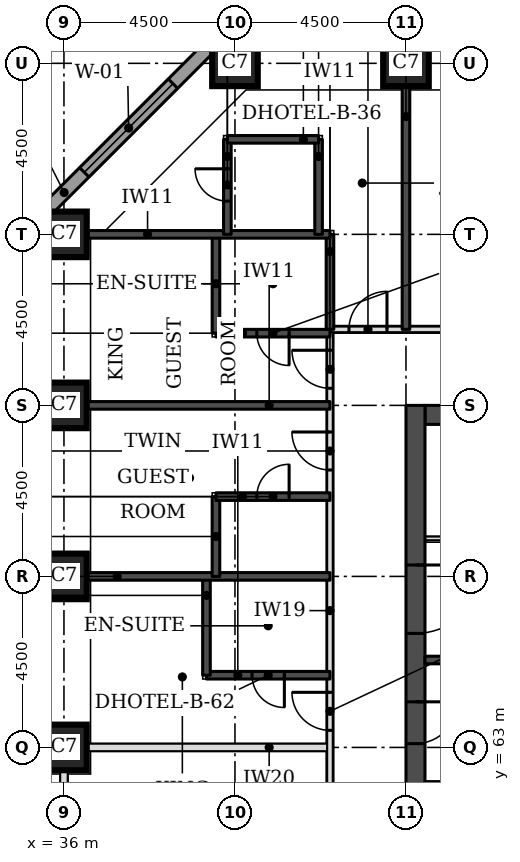
"""IFC4 building model, lengths in metres.
Left out: names, types, materials, properties, quantities, classifications, styles, units other than length and angle.
Written with IfcOpenShell. Run it as: python <this file> out.ifc"""

import sys

from ifc_helpers import new_model, si_unit, direction, frame, frame_2d, origin, origin_2d, place, context, subcontext, project, spatial, rectangle, extrude, element, fill, save


model = new_model("IFC4")
c1 = context("Model", 3, precision=1e-05, world=origin(), true_north=direction((0.0, 1.0)))
c2 = subcontext(c1, "Body", "Model", "MODEL_VIEW")
j1 = project(units=[si_unit("LENGTHUNIT", "METRE"), si_unit("PLANEANGLEUNIT", "RADIAN")], contexts=[c1])
p1 = place(None, origin())
s1 = spatial("IfcSite", under=j1, at=p1, CompositionType="ELEMENT")
p2 = place(p1, origin())
s2 = spatial("IfcBuilding", under=s1, at=p2, CompositionType="ELEMENT")
p3 = place(p2, frame((0.0, 0.0, 52.8)))
s3 = spatial("IfcBuildingStorey", under=s2, at=p3, CompositionType="ELEMENT", Elevation=52.8)
for number, where, z_axis, x_axis in (
    (1, (36.0, 63.0, 0.0), (0.0, 0.0, 1.0), (1.0, 0.0, 0.0)),
    (2, (36.0, 67.5, 0.0), (0.0, 0.0, 1.0), (1.0, 0.0, 0.0)),
    (3, (36.0, 72.0, 0.0), (0.0, 0.0, 1.0), (1.0, 0.0, 0.0)),
    (4, (36.0, 76.5, 0.0), (0.0, 0.0, 1.0), (1.0, 0.0, 0.0)),
    (5, (40.5, 81.0, 0.0), (0.0, 0.0, 1.0), (1.0, 0.0, 0.0)),
    (6, (45.0, 81.0, 0.0), (0.0, 0.0, 1.0), (1.0, 0.0, 0.0)),
):
    element("IfcColumn", number, at=place(p3, frame(where, z_axis=z_axis, x_axis=x_axis)), inside=s3, PredefinedType="COLUMN", context=c2, shape_type="SweptSolid", body=[
        extrude(rectangle(XDim=1.2, YDim=1.2, at=origin_2d()), origin(), (0.0, 0.0, 1.0), 3.3),
    ])
p4 = place(p3, frame((45.5, 71.75, 0.0), z_axis=(0.0, 0.0, 1.0), x_axis=(1.0, 0.0, 0.0)))
e7 = element("IfcWall", 7, at=p4, inside=s3, PredefinedType="SHEAR", context=c2, shape_type="SweptSolid", body=[
    extrude(rectangle(XDim=21.5, YDim=0.5, at=frame_2d((10.75, 0.0))), origin(), (0.0, 0.0, 1.0), 3.3),
])
p5 = place(p3, frame((45.25, 49.5, 0.0), z_axis=(0.0, 0.0, 1.0), x_axis=(0.0, 1.0, 0.0)))
e8 = element("IfcWall", 8, at=p5, inside=s3, PredefinedType="SHEAR", context=c2, shape_type="SweptSolid", body=[
    extrude(rectangle(XDim=22.5, YDim=0.5, at=frame_2d((11.25, 0.0))), origin(), (0.0, 0.0, 1.0), 3.3),
])
p6 = place(p5, frame((4.2, 0.0, 0.0)))
e9 = element("IfcOpeningElement", 9, at=p6, cuts=e8, PredefinedType="OPENING", context=c2, shape_type="SweptSolid", body=[
    extrude(rectangle(XDim=1.8, YDim=2.1, at=frame_2d((0.9, 1.05))), frame((0.0, 0.26, 0.0), z_axis=(0.0, -1.0, 0.0), x_axis=(1.0, 0.0, 0.0)), (0.0, 0.0, 1.0), 0.52),
])
p7 = place(p5, frame((6.9, 0.0, 0.0)))
e10 = element("IfcOpeningElement", 10, at=p7, cuts=e8, PredefinedType="OPENING", context=c2, shape_type="SweptSolid", body=[
    extrude(rectangle(XDim=1.1, YDim=2.1, at=frame_2d((0.55, 1.05))), frame((0.0, 0.26, 0.0), z_axis=(0.0, -1.0, 0.0), x_axis=(1.0, 0.0, 0.0)), (0.0, 0.0, 1.0), 0.52),
])
p8 = place(p5, frame((13.6, 0.0, 0.0)))
e11 = element("IfcOpeningElement", 11, at=p8, cuts=e8, PredefinedType="OPENING", context=c2, shape_type="SweptSolid", body=[
    extrude(rectangle(XDim=1.1, YDim=2.1, at=frame_2d((0.55, 1.05))), frame((0.0, 0.26, 0.0), z_axis=(0.0, -1.0, 0.0), x_axis=(1.0, 0.0, 0.0)), (0.0, 0.0, 1.0), 0.52),
])
p9 = place(p5, frame((16.5, 0.0, 0.0)))
e12 = element("IfcOpeningElement", 12, at=p9, cuts=e8, PredefinedType="OPENING", context=c2, shape_type="SweptSolid", body=[
    extrude(rectangle(XDim=1.8, YDim=2.1, at=frame_2d((0.9, 1.05))), frame((0.0, 0.26, 0.0), z_axis=(0.0, -1.0, 0.0), x_axis=(1.0, 0.0, 0.0)), (0.0, 0.0, 1.0), 0.52),
])
p10 = place(p3, frame((40.23, 81.826, 0.0), z_axis=(0.0, 0.0, 1.0), x_axis=(-0.707106781187, -0.707106781187, 0.0)))
e13 = element("IfcWall", 13, at=p10, inside=s3, PredefinedType="STANDARD", context=c2, shape_type="SweptSolid", body=[
    extrude(rectangle(XDim=7.151, YDim=0.35, at=frame_2d((3.576, 0.0))), origin(), (0.0, 0.0, 1.0), 3.055),
])
p11 = place(p10, frame((1.926, 0.0, 0.8)))
e14 = element("IfcOpeningElement", 14, at=p11, cuts=e13, PredefinedType="OPENING", context=c2, shape_type="SweptSolid", body=[
    extrude(rectangle(XDim=3.3, YDim=1.5, at=frame_2d((1.65, 0.75))), frame((0.0, 0.185, 0.0), z_axis=(0.0, -1.0, 0.0), x_axis=(1.0, 0.0, 0.0)), (0.0, 0.0, 1.0), 0.37),
])
p12 = place(p3, frame((36.0, 56.0, 0.0), z_axis=(0.0, 0.0, 1.0), x_axis=(0.0, 1.0, 0.0)))
e15 = element("IfcWall", 15, at=p12, inside=s3, PredefinedType="PARTITIONING", context=c2, shape_type="SweptSolid", body=[
    extrude(rectangle(XDim=6.4, YDim=0.2, at=frame_2d((3.2, 0.0))), origin(), (0.0, 0.0, 1.0), 2.33),
])
p13 = place(p3, frame((36.6, 63.0, 0.0), z_axis=(0.0, 0.0, 1.0), x_axis=(1.0, 0.0, 0.0)))
e16 = element("IfcWall", 16, at=p13, inside=s3, PredefinedType="PARTITIONING", context=c2, shape_type="SweptSolid", body=[
    extrude(rectangle(XDim=6.4, YDim=0.2, at=frame_2d((3.2, 0.0))), origin(), (0.0, 0.0, 1.0), 3.08),
])
p14 = place(p3, frame((43.0, 56.0, 0.0), z_axis=(0.0, 0.0, 1.0), x_axis=(0.0, 1.0, 0.0)))
e17 = element("IfcWall", 17, at=p14, inside=s3, PredefinedType="PARTITIONING", context=c2, shape_type="SweptSolid", body=[
    extrude(rectangle(XDim=18.0, YDim=0.15, at=frame_2d((9.0, 0.0))), origin(), (0.0, 0.0, 1.0), 3.08),
])
p15 = place(p14, frame((7.45, 0.0, 0.0)))
e18 = element("IfcOpeningElement", 18, at=p15, cuts=e17, PredefinedType="OPENING", context=c2, shape_type="SweptSolid", body=[
    extrude(rectangle(XDim=1.0, YDim=2.1, at=frame_2d((0.5, 1.05))), frame((0.0, 0.085, 0.0), z_axis=(0.0, -1.0, 0.0), x_axis=(1.0, 0.0, 0.0)), (0.0, 0.0, 1.0), 0.17),
])
p16 = place(p14, frame((14.3, 0.0, 0.0)))
e19 = element("IfcOpeningElement", 19, at=p16, cuts=e17, PredefinedType="OPENING", context=c2, shape_type="SweptSolid", body=[
    extrude(rectangle(XDim=1.0, YDim=2.1, at=frame_2d((0.5, 1.05))), frame((0.0, 0.085, 0.0), z_axis=(0.0, -1.0, 0.0), x_axis=(1.0, 0.0, 0.0)), (0.0, 0.0, 1.0), 0.17),
])
p17 = place(p14, frame((16.45, 0.0, 0.0)))
e20 = element("IfcOpeningElement", 20, at=p17, cuts=e17, PredefinedType="OPENING", context=c2, shape_type="SweptSolid", body=[
    extrude(rectangle(XDim=1.0, YDim=2.1, at=frame_2d((0.5, 1.05))), frame((0.0, 0.085, 0.0), z_axis=(0.0, -1.0, 0.0), x_axis=(1.0, 0.0, 0.0)), (0.0, 0.0, 1.0), 0.17),
])
p18 = place(p14, frame((3.05, 0.0, 0.0)))
e21 = element("IfcOpeningElement", 21, at=p18, cuts=e17, PredefinedType="OPENING", context=c2, shape_type="SweptSolid", body=[
    extrude(rectangle(XDim=0.9, YDim=2.1, at=frame_2d((0.45, 1.05))), frame((0.0, 0.085, 0.0), z_axis=(0.0, -1.0, 0.0), x_axis=(1.0, 0.0, 0.0)), (0.0, 0.0, 1.0), 0.17),
])
p19 = place(p3, frame((43.0, 74.0, 0.0), z_axis=(0.0, 0.0, 1.0), x_axis=(1.0, 0.0, 0.0)))
e22 = element("IfcWall", 22, at=p19, inside=s3, PredefinedType="PARTITIONING", context=c2, shape_type="SweptSolid", body=[
    extrude(rectangle(XDim=26.5, YDim=0.15, at=frame_2d((13.25, 0.0))), origin(), (0.0, 0.0, 1.0), 3.08),
])
p20 = place(p19, frame((4.65, 0.0, 0.0)))
e23 = element("IfcOpeningElement", 23, at=p20, cuts=e22, PredefinedType="OPENING", context=c2, shape_type="SweptSolid", body=[
    extrude(rectangle(XDim=1.0, YDim=2.1, at=frame_2d((0.5, 1.05))), frame((0.0, 0.085, 0.0), z_axis=(0.0, -1.0, 0.0), x_axis=(1.0, 0.0, 0.0)), (0.0, 0.0, 1.0), 0.17),
])
p21 = place(p19, frame((16.6, 0.0, 0.0)))
e24 = element("IfcOpeningElement", 24, at=p21, cuts=e22, PredefinedType="OPENING", context=c2, shape_type="SweptSolid", body=[
    extrude(rectangle(XDim=1.0, YDim=2.1, at=frame_2d((0.5, 1.05))), frame((0.0, 0.085, 0.0), z_axis=(0.0, -1.0, 0.0), x_axis=(1.0, 0.0, 0.0)), (0.0, 0.0, 1.0), 0.17),
])
p22 = place(p19, frame((20.7, 0.0, 0.0)))
e25 = element("IfcOpeningElement", 25, at=p22, cuts=e22, PredefinedType="OPENING", context=c2, shape_type="SweptSolid", body=[
    extrude(rectangle(XDim=1.0, YDim=2.1, at=frame_2d((0.5, 1.05))), frame((0.0, 0.085, 0.0), z_axis=(0.0, -1.0, 0.0), x_axis=(1.0, 0.0, 0.0)), (0.0, 0.0, 1.0), 0.17),
])
p23 = place(p19, frame((0.5, 0.0, 0.0)))
e26 = element("IfcOpeningElement", 26, at=p23, cuts=e22, PredefinedType="OPENING", context=c2, shape_type="SweptSolid", body=[
    extrude(rectangle(XDim=1.0, YDim=2.1, at=frame_2d((0.5, 1.05))), frame((0.0, 0.085, 0.0), z_axis=(0.0, -1.0, 0.0), x_axis=(1.0, 0.0, 0.0)), (0.0, 0.0, 1.0), 0.17),
])
p24 = place(p19, frame((25.0, 0.0, 0.0)))
e27 = element("IfcOpeningElement", 27, at=p24, cuts=e22, PredefinedType="OPENING", context=c2, shape_type="SweptSolid", body=[
    extrude(rectangle(XDim=1.0, YDim=2.1, at=frame_2d((0.5, 1.05))), frame((0.0, 0.085, 0.0), z_axis=(0.0, -1.0, 0.0), x_axis=(1.0, 0.0, 0.0)), (0.0, 0.0, 1.0), 0.17),
])
p25 = place(p3, frame((39.75, 64.9, 0.0), z_axis=(0.0, 0.0, 1.0), x_axis=(1.0, 0.0, 0.0)))
e28 = element("IfcWall", 28, at=p25, inside=s3, PredefinedType="SOLIDWALL", context=c2, shape_type="SweptSolid", body=[
    extrude(rectangle(XDim=3.25, YDim=0.2, at=frame_2d((1.625, 0.0))), origin(), (0.0, 0.0, 1.0), 3.08),
])
p26 = place(p25, frame((1.2, 0.0, 0.0)))
e29 = element("IfcOpeningElement", 29, at=p26, cuts=e28, PredefinedType="OPENING", context=c2, shape_type="SweptSolid", body=[
    extrude(rectangle(XDim=0.85, YDim=2.1, at=frame_2d((0.425, 1.05))), frame((0.0, 0.11, 0.0), z_axis=(0.0, -1.0, 0.0), x_axis=(1.0, 0.0, 0.0)), (0.0, 0.0, 1.0), 0.22),
])
p27 = place(p3, frame((39.75, 64.9, 0.0), z_axis=(0.0, 0.0, 1.0), x_axis=(0.0, 1.0, 0.0)))
e30 = element("IfcWall", 30, at=p27, inside=s3, PredefinedType="SOLIDWALL", context=c2, shape_type="SweptSolid", body=[
    extrude(rectangle(XDim=2.6, YDim=0.2, at=frame_2d((1.3, 0.0))), origin(), (0.0, 0.0, 1.0), 3.08),
])
p28 = place(p3, frame((36.6, 67.5, 0.0), z_axis=(0.0, 0.0, 1.0), x_axis=(1.0, 0.0, 0.0)))
e31 = element("IfcWall", 31, at=p28, inside=s3, PredefinedType="SOLIDWALL", context=c2, shape_type="SweptSolid", body=[
    extrude(rectangle(XDim=6.4, YDim=0.2, at=frame_2d((3.2, 0.0))), origin(), (0.0, 0.0, 1.0), 3.08),
])
p29 = place(p3, frame((40.0, 67.5, 0.0), z_axis=(0.0, 0.0, 1.0), x_axis=(0.0, 1.0, 0.0)))
e32 = element("IfcWall", 32, at=p29, inside=s3, PredefinedType="SOLIDWALL", context=c2, shape_type="SweptSolid", body=[
    extrude(rectangle(XDim=2.1, YDim=0.2, at=frame_2d((1.05, 0.0))), origin(), (0.0, 0.0, 1.0), 3.08),
])
p30 = place(p3, frame((40.0, 69.6, 0.0), z_axis=(0.0, 0.0, 1.0), x_axis=(1.0, 0.0, 0.0)))
e33 = element("IfcWall", 33, at=p30, inside=s3, PredefinedType="SOLIDWALL", context=c2, shape_type="SweptSolid", body=[
    extrude(rectangle(XDim=3.0, YDim=0.2, at=frame_2d((1.5, 0.0))), origin(), (0.0, 0.0, 1.0), 3.08),
])
p31 = place(p30, frame((1.075, 0.0, 0.0)))
e34 = element("IfcOpeningElement", 34, at=p31, cuts=e33, PredefinedType="OPENING", context=c2, shape_type="SweptSolid", body=[
    extrude(rectangle(XDim=0.85, YDim=2.1, at=frame_2d((0.425, 1.05))), frame((0.0, 0.11, 0.0), z_axis=(0.0, -1.0, 0.0), x_axis=(1.0, 0.0, 0.0)), (0.0, 0.0, 1.0), 0.22),
])
p32 = place(p3, frame((36.6, 72.0, 0.0), z_axis=(0.0, 0.0, 1.0), x_axis=(1.0, 0.0, 0.0)))
e35 = element("IfcWall", 35, at=p32, inside=s3, PredefinedType="SOLIDWALL", context=c2, shape_type="SweptSolid", body=[
    extrude(rectangle(XDim=6.4, YDim=0.2, at=frame_2d((3.2, 0.0))), origin(), (0.0, 0.0, 1.0), 3.08),
])
p33 = place(p3, frame((40.0, 73.9, 0.0), z_axis=(0.0, 0.0, 1.0), x_axis=(1.0, 0.0, 0.0)))
e36 = element("IfcWall", 36, at=p33, inside=s3, PredefinedType="SOLIDWALL", context=c2, shape_type="SweptSolid", body=[
    extrude(rectangle(XDim=3.0, YDim=0.2, at=frame_2d((1.5, 0.0))), origin(), (0.0, 0.0, 1.0), 3.08),
])
p34 = place(p33, frame((1.075, 0.0, 0.0)))
e37 = element("IfcOpeningElement", 37, at=p34, cuts=e36, PredefinedType="OPENING", context=c2, shape_type="SweptSolid", body=[
    extrude(rectangle(XDim=0.85, YDim=2.1, at=frame_2d((0.425, 1.05))), frame((0.0, 0.11, 0.0), z_axis=(0.0, -1.0, 0.0), x_axis=(1.0, 0.0, 0.0)), (0.0, 0.0, 1.0), 0.22),
])
p35 = place(p3, frame((40.0, 73.9, 0.0), z_axis=(0.0, 0.0, 1.0), x_axis=(0.0, 1.0, 0.0)))
e38 = element("IfcWall", 38, at=p35, inside=s3, PredefinedType="SOLIDWALL", context=c2, shape_type="SweptSolid", body=[
    extrude(rectangle(XDim=2.6, YDim=0.2, at=frame_2d((1.3, 0.0))), origin(), (0.0, 0.0, 1.0), 3.08),
])
p36 = place(p3, frame((43.0, 74.0, 0.0), z_axis=(0.0, 0.0, 1.0), x_axis=(0.0, 1.0, 0.0)))
e39 = element("IfcWall", 39, at=p36, inside=s3, PredefinedType="SOLIDWALL", context=c2, shape_type="SweptSolid", body=[
    extrude(rectangle(XDim=2.5, YDim=0.2, at=frame_2d((1.25, 0.0))), origin(), (0.0, 0.0, 1.0), 3.08),
])
for number, where, z_axis, x_axis in (
    (40, (45.0, 74.0, 0.0), (0.0, 0.0, 1.0), (0.0, 1.0, 0.0)),
    (41, (36.6, 76.5, 0.0), (0.0, 0.0, 1.0), (1.0, 0.0, 0.0)),
):
    element("IfcWall", number, at=place(p3, frame(where, z_axis=z_axis, x_axis=x_axis)), inside=s3, PredefinedType="SOLIDWALL", context=c2, shape_type="SweptSolid", body=[
        extrude(rectangle(XDim=6.4, YDim=0.2, at=frame_2d((3.2, 0.0))), origin(), (0.0, 0.0, 1.0), 3.08),
    ])
p37 = place(p3, frame((40.3, 76.5, 0.0), z_axis=(0.0, 0.0, 1.0), x_axis=(0.0, 1.0, 0.0)))
e42 = element("IfcWall", 42, at=p37, inside=s3, PredefinedType="SOLIDWALL", context=c2, shape_type="SweptSolid", body=[
    extrude(rectangle(XDim=2.5, YDim=0.2, at=frame_2d((1.25, 0.0))), origin(), (0.0, 0.0, 1.0), 3.08),
])
p38 = place(p37, frame((0.875, 0.0, 0.0)))
e43 = element("IfcOpeningElement", 43, at=p38, cuts=e42, PredefinedType="OPENING", context=c2, shape_type="SweptSolid", body=[
    extrude(rectangle(XDim=0.85, YDim=2.1, at=frame_2d((0.425, 1.05))), frame((0.0, 0.11, 0.0), z_axis=(0.0, -1.0, 0.0), x_axis=(1.0, 0.0, 0.0)), (0.0, 0.0, 1.0), 0.22),
])
p39 = place(p3, frame((42.7, 76.5, 0.0), z_axis=(0.0, 0.0, 1.0), x_axis=(0.0, 1.0, 0.0)))
e44 = element("IfcWall", 44, at=p39, inside=s3, PredefinedType="SOLIDWALL", context=c2, shape_type="SweptSolid", body=[
    extrude(rectangle(XDim=2.5, YDim=0.2, at=frame_2d((1.25, 0.0))), origin(), (0.0, 0.0, 1.0), 3.08),
])
p40 = place(p3, frame((40.3, 79.0, 0.0), z_axis=(0.0, 0.0, 1.0), x_axis=(1.0, 0.0, 0.0)))
e45 = element("IfcWall", 45, at=p40, inside=s3, PredefinedType="SOLIDWALL", context=c2, shape_type="SweptSolid", body=[
    extrude(rectangle(XDim=2.4, YDim=0.2, at=frame_2d((1.2, 0.0))), origin(), (0.0, 0.0, 1.0), 3.08),
])
p41 = place(p3, frame((45.5, 65.3, 0.0), z_axis=(0.0, 0.0, 1.0), x_axis=(1.0, 0.0, 0.0)))
e46 = element("IfcWall", 46, at=p41, inside=s3, PredefinedType="SOLIDWALL", context=c2, shape_type="SweptSolid", body=[
    extrude(rectangle(XDim=2.3, YDim=0.2, at=frame_2d((1.15, 0.0))), origin(), (0.0, 0.0, 1.0), 3.08),
])
p42 = place(p3, frame((45.5, 68.5, 0.0), z_axis=(0.0, 0.0, 1.0), x_axis=(1.0, 0.0, 0.0)))
e47 = element("IfcWall", 47, at=p42, inside=s3, PredefinedType="PARTITIONING", context=c2, shape_type="SweptSolid", body=[
    extrude(rectangle(XDim=5.15, YDim=0.1, at=frame_2d((2.575, 0.0))), origin(), (0.0, 0.0, 1.0), 3.08),
])
p43 = place(p42, frame((0.837, 0.0, 0.0)))
e48 = element("IfcOpeningElement", 48, at=p43, cuts=e47, PredefinedType="OPENING", context=c2, shape_type="SweptSolid", body=[
    extrude(rectangle(XDim=0.9, YDim=2.1, at=frame_2d((0.45, 1.05))), frame((0.0, 0.06, 0.0), z_axis=(0.0, -1.0, 0.0), x_axis=(1.0, 0.0, 0.0)), (0.0, 0.0, 1.0), 0.12),
])
p44 = place(p42, frame((3.413, 0.0, 0.0)))
e49 = element("IfcOpeningElement", 49, at=p44, cuts=e47, PredefinedType="OPENING", context=c2, shape_type="SweptSolid", body=[
    extrude(rectangle(XDim=0.9, YDim=2.1, at=frame_2d((0.45, 1.05))), frame((0.0, 0.06, 0.0), z_axis=(0.0, -1.0, 0.0), x_axis=(1.0, 0.0, 0.0)), (0.0, 0.0, 1.0), 0.12),
])
p45 = place(p11, origin())
e50 = element("IfcWindow", 50, at=p45, inside=s3, PartitioningType="SINGLE_PANEL", PredefinedType="WINDOW", context=c2, shape_type="SweptSolid", body=[
    extrude(rectangle(XDim=3.3, YDim=1.5, at=frame_2d((1.65, 0.75))), frame((0.0, 0.085, 0.0), z_axis=(0.0, -1.0, 0.0), x_axis=(1.0, 0.0, 0.0)), (0.0, 0.0, 1.0), 0.06),
])
fill(e14, e50)
p46 = place(p15, origin())
e51 = element("IfcDoor", 51, at=p46, inside=s3, OperationType="SINGLE_SWING_RIGHT", PredefinedType="DOOR", context=c2, shape_type="SweptSolid", body=[
    extrude(rectangle(XDim=1.0, YDim=2.1, at=frame_2d((0.5, 1.05))), frame((0.0, 0.025, 0.0), z_axis=(0.0, -1.0, 0.0), x_axis=(1.0, 0.0, 0.0)), (0.0, 0.0, 1.0), 0.05),
])
fill(e18, e51)
p47 = place(p26, frame((0.85, 0.0, 0.0), z_axis=(0.0, 0.0, 1.0), x_axis=(-1.0, 0.0, 0.0)))
e52 = element("IfcDoor", 52, at=p47, inside=s3, OperationType="SINGLE_SWING_LEFT", PredefinedType="DOOR", context=c2, shape_type="SweptSolid", body=[
    extrude(rectangle(XDim=0.85, YDim=2.1, at=frame_2d((0.425, 1.05))), frame((0.0, 0.025, 0.0), z_axis=(0.0, -1.0, 0.0), x_axis=(1.0, 0.0, 0.0)), (0.0, 0.0, 1.0), 0.05),
])
fill(e29, e52)
p48 = place(p16, origin())
e53 = element("IfcDoor", 53, at=p48, inside=s3, OperationType="SINGLE_SWING_RIGHT", PredefinedType="DOOR", context=c2, shape_type="SweptSolid", body=[
    extrude(rectangle(XDim=1.0, YDim=2.1, at=frame_2d((0.5, 1.05))), frame((0.0, 0.025, 0.0), z_axis=(0.0, -1.0, 0.0), x_axis=(1.0, 0.0, 0.0)), (0.0, 0.0, 1.0), 0.05),
])
fill(e19, e53)
p49 = place(p31, origin())
e54 = element("IfcDoor", 54, at=p49, inside=s3, OperationType="SINGLE_SWING_RIGHT", PredefinedType="DOOR", context=c2, shape_type="SweptSolid", body=[
    extrude(rectangle(XDim=0.85, YDim=2.1, at=frame_2d((0.425, 1.05))), frame((0.0, 0.025, 0.0), z_axis=(0.0, -1.0, 0.0), x_axis=(1.0, 0.0, 0.0)), (0.0, 0.0, 1.0), 0.05),
])
fill(e34, e54)
p50 = place(p17, origin())
e55 = element("IfcDoor", 55, at=p50, inside=s3, OperationType="SINGLE_SWING_RIGHT", PredefinedType="DOOR", context=c2, shape_type="SweptSolid", body=[
    extrude(rectangle(XDim=1.0, YDim=2.1, at=frame_2d((0.5, 1.05))), frame((0.0, 0.025, 0.0), z_axis=(0.0, -1.0, 0.0), x_axis=(1.0, 0.0, 0.0)), (0.0, 0.0, 1.0), 0.05),
])
fill(e20, e55)
p51 = place(p34, frame((0.85, 0.0, 0.0), z_axis=(0.0, 0.0, 1.0), x_axis=(-1.0, 0.0, 0.0)))
e56 = element("IfcDoor", 56, at=p51, inside=s3, OperationType="SINGLE_SWING_LEFT", PredefinedType="DOOR", context=c2, shape_type="SweptSolid", body=[
    extrude(rectangle(XDim=0.85, YDim=2.1, at=frame_2d((0.425, 1.05))), frame((0.0, 0.025, 0.0), z_axis=(0.0, -1.0, 0.0), x_axis=(1.0, 0.0, 0.0)), (0.0, 0.0, 1.0), 0.05),
])
fill(e37, e56)
p52 = place(p23, origin())
e57 = element("IfcDoor", 57, at=p52, inside=s3, OperationType="SINGLE_SWING_RIGHT", PredefinedType="DOOR", context=c2, shape_type="SweptSolid", body=[
    extrude(rectangle(XDim=1.0, YDim=2.1, at=frame_2d((0.5, 1.05))), frame((0.0, 0.025, 0.0), z_axis=(0.0, -1.0, 0.0), x_axis=(1.0, 0.0, 0.0)), (0.0, 0.0, 1.0), 0.05),
])
fill(e26, e57)
p53 = place(p38, origin())
e58 = element("IfcDoor", 58, at=p53, inside=s3, OperationType="SINGLE_SWING_RIGHT", PredefinedType="DOOR", context=c2, shape_type="SweptSolid", body=[
    extrude(rectangle(XDim=0.85, YDim=2.1, at=frame_2d((0.425, 1.05))), frame((0.0, 0.025, 0.0), z_axis=(0.0, -1.0, 0.0), x_axis=(1.0, 0.0, 0.0)), (0.0, 0.0, 1.0), 0.05),
])
fill(e43, e58)
p54 = place(p8, frame((1.1, 0.0, 0.0), z_axis=(0.0, 0.0, 1.0), x_axis=(-1.0, 0.0, 0.0)))
e59 = element("IfcDoor", 59, at=p54, inside=s3, OperationType="SINGLE_SWING_LEFT", PredefinedType="DOOR", context=c2, shape_type="SweptSolid", body=[
    extrude(rectangle(XDim=1.1, YDim=2.1, at=frame_2d((0.55, 1.05))), frame((0.0, 0.025, 0.0), z_axis=(0.0, -1.0, 0.0), x_axis=(1.0, 0.0, 0.0)), (0.0, 0.0, 1.0), 0.05),
])
fill(e11, e59)
p55 = place(p9, frame((1.8, 0.0, 0.0), z_axis=(0.0, 0.0, 1.0), x_axis=(-1.0, 0.0, 0.0)))
e60 = element("IfcDoor", 60, at=p55, inside=s3, OperationType="SINGLE_SWING_LEFT", PredefinedType="DOOR", context=c2, shape_type="SweptSolid", body=[
    extrude(rectangle(XDim=1.8, YDim=2.1, at=frame_2d((0.9, 1.05))), frame((0.0, 0.025, 0.0), z_axis=(0.0, -1.0, 0.0), x_axis=(1.0, 0.0, 0.0)), (0.0, 0.0, 1.0), 0.05),
])
fill(e12, e60)
save(model, sys.argv[1])
